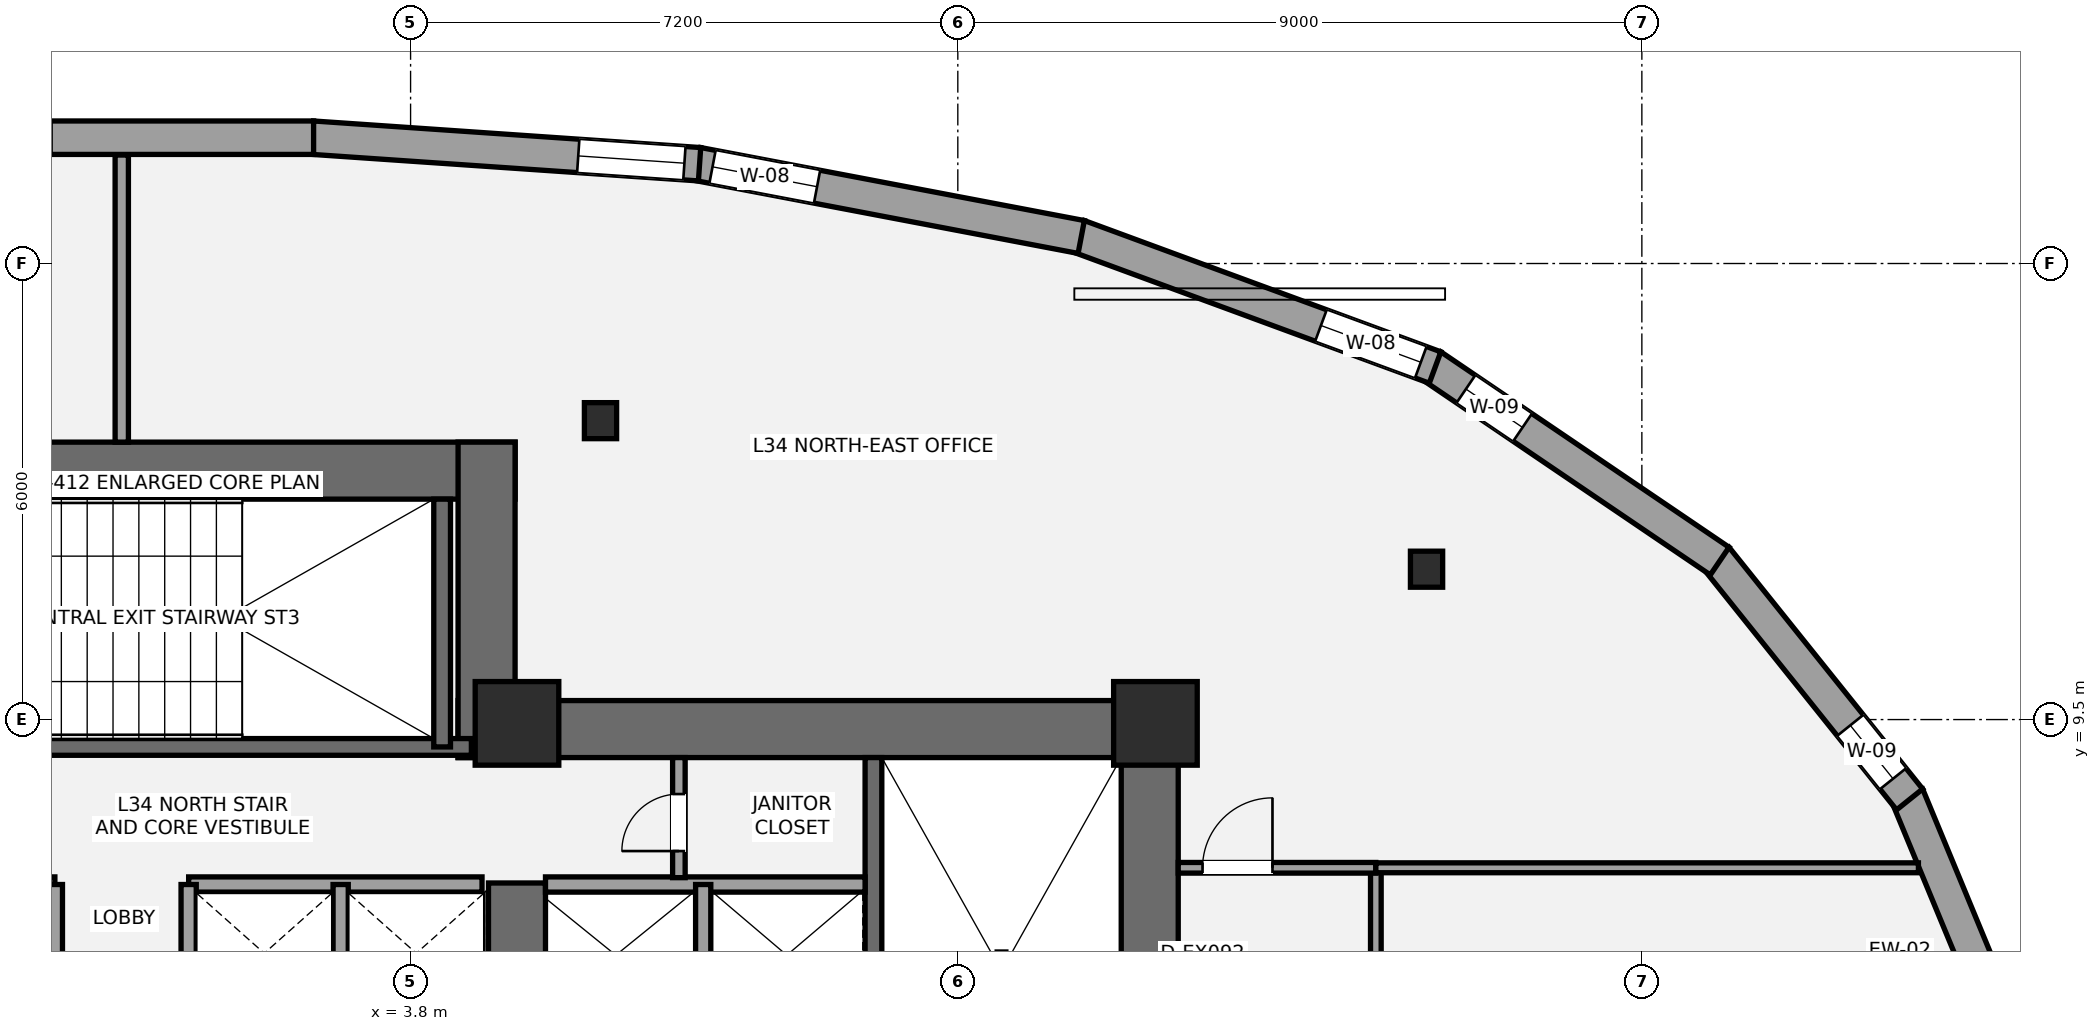
"""IFC4 building model, lengths in metres.
Left out: names, types, materials, properties, quantities, classifications, styles, units other than length and angle.
Written with IfcOpenShell. Run it as: python <this file> out.ifc"""

import sys

from ifc_helpers import new_model, si_unit, direction, frame, frame_2d, origin, origin_2d, place, context, subcontext, project, spatial, rectangle, i_section, extrude, element, fill, save


model = new_model("IFC4")
c1 = context("Model", 3, precision=1e-05, world=origin(), true_north=direction((0.0, 1.0)))
c2 = subcontext(c1, "Body", "Model", "MODEL_VIEW")
j1 = project(units=[si_unit("LENGTHUNIT", "METRE"), si_unit("PLANEANGLEUNIT", "RADIAN")], contexts=[c1])
p1 = place(None, origin())
s1 = spatial("IfcSite", under=j1, at=p1, CompositionType="ELEMENT")
p2 = place(p1, origin())
s2 = spatial("IfcBuilding", under=s1, at=p2, CompositionType="ELEMENT")
p3 = place(p2, frame((0.0, 0.0, 128.1)))
s3 = spatial("IfcBuildingStorey", under=s2, at=p3, CompositionType="ELEMENT", Elevation=128.1)
p4 = place(p3, frame((13.525, 1.1, 0.0), z_axis=(0.0, 0.0, 1.0), x_axis=(0.0, 1.0, 0.0)))
e1 = element("IfcWall", 1, at=p4, inside=s3, PredefinedType="SHEAR", context=c2, shape_type="SweptSolid", body=[
    extrude(rectangle(XDim=8.65, YDim=0.75, at=frame_2d((4.325, 0.0))), origin(), (0.0, 0.0, 1.0), 3.5),
])
p5 = place(p3, frame((4.425, 9.375, 0.0), z_axis=(0.0, 0.0, 1.0), x_axis=(1.0, 0.0, 0.0)))
e2 = element("IfcWall", 2, at=p5, inside=s3, PredefinedType="SHEAR", context=c2, shape_type="SweptSolid", body=[
    extrude(rectangle(XDim=9.475, YDim=0.75, at=frame_2d((4.737, 0.0))), origin(), (0.0, 0.0, 1.0), 3.5),
])
p6 = place(p3, frame((5.2, 5.35, 0.0), z_axis=(0.0, 0.0, 1.0), x_axis=(0.0, 1.0, 0.0)))
e3 = element("IfcWall", 3, at=p6, inside=s3, PredefinedType="SHEAR", context=c2, shape_type="SweptSolid", body=[
    extrude(rectangle(XDim=2.0, YDim=0.75, at=frame_2d((1.0, 0.0))), origin(), (0.0, 0.0, 1.0), 3.5),
])
p7 = place(p3, frame((9.89, 1.85, 0.0), z_axis=(0.0, 0.0, 1.0), x_axis=(0.0, 1.0, 0.0)))
e4 = element("IfcWall", 4, at=p7, inside=s3, PredefinedType="SHEAR", context=c2, shape_type="SweptSolid", body=[
    extrude(rectangle(XDim=7.15, YDim=0.22, at=frame_2d((3.575, 0.0))), origin(), (0.0, 0.0, 1.0), 3.5),
])
p8 = place(p3, frame((-5.175, 12.775, 0.0), z_axis=(0.0, 0.0, 1.0), x_axis=(1.0, 0.0, 0.0)))
e5 = element("IfcWall", 5, at=p8, inside=s3, PredefinedType="SHEAR", context=c2, shape_type="SweptSolid", body=[
    extrude(rectangle(XDim=10.35, YDim=0.75, at=frame_2d((5.175, 0.0))), origin(), (0.0, 0.0, 1.0), 3.5),
])
p9 = place(p3, frame((4.8, 9.0, 0.0), z_axis=(0.0, 0.0, 1.0), x_axis=(0.0, 1.0, 0.0)))
e6 = element("IfcWall", 6, at=p9, inside=s3, PredefinedType="SHEAR", context=c2, shape_type="SweptSolid", body=[
    extrude(rectangle(XDim=4.15, YDim=0.75, at=frame_2d((2.075, 0.0))), origin(), (0.0, 0.0, 1.0), 3.5),
])
p10 = place(p3, frame((-4.7, 9.14, 0.0), z_axis=(0.0, 0.0, 1.0), x_axis=(1.0, 0.0, 0.0)))
e7 = element("IfcWall", 7, at=p10, inside=s3, PredefinedType="SHEAR", context=c2, shape_type="SweptSolid", body=[
    extrude(rectangle(XDim=9.3, YDim=0.22, at=frame_2d((4.65, 0.0))), origin(), (0.0, 0.0, 1.0), 3.5),
])
p11 = place(p10, frame((1.15, 0.0, 0.0)))
e8 = element("IfcOpeningElement", 8, at=p11, cuts=e7, PredefinedType="OPENING", context=c2, shape_type="SweptSolid", body=[
    extrude(rectangle(XDim=1.05, YDim=2.15, at=frame_2d((0.525, 1.075))), frame((0.0, 0.12, 0.0), z_axis=(0.0, -1.0, 0.0), x_axis=(1.0, 0.0, 0.0)), (0.0, 0.0, 1.0), 0.24),
])
p12 = place(p3, frame((4.215, 9.14, 0.0), z_axis=(0.0, 0.0, 1.0), x_axis=(0.0, 1.0, 0.0)))
e9 = element("IfcWall", 9, at=p12, inside=s3, PredefinedType="SHEAR", context=c2, shape_type="SweptSolid", body=[
    extrude(rectangle(XDim=3.26, YDim=0.22, at=frame_2d((1.63, 0.0))), origin(), (0.0, 0.0, 1.0), 3.5),
])
for number, where, z_axis, x_axis in (
    (10, (5.2, 9.45, 0.0), (0.0, 0.0, 1.0), (1.0, 0.0, 0.0)),
    (11, (13.6, 9.45, 0.0), (0.0, 0.0, 1.0), (1.0, 0.0, 0.0)),
):
    element("IfcColumn", number, at=place(p3, frame(where, z_axis=z_axis, x_axis=x_axis)), inside=s3, PredefinedType="COLUMN", context=c2, shape_type="SweptSolid", body=[
        extrude(rectangle(XDim=1.1, YDim=1.1, at=origin_2d()), origin(), (0.0, 0.0, 1.0), 3.5),
    ])
for number, where, z_axis, x_axis in (
    (12, (17.167, 11.478, 0.0), (0.0, 0.0, 1.0), (1.0, 0.0, 0.0)),
    (13, (6.299, 13.433, 0.0), (0.0, 0.0, 1.0), (1.0, 0.0, 0.0)),
):
    element("IfcColumn", number, at=place(p3, frame(where, z_axis=z_axis, x_axis=x_axis)), inside=s3, PredefinedType="COLUMN", context=c2, shape_type="SweptSolid", body=[
        extrude(i_section(OverallWidth=0.424, OverallDepth=0.474, WebThickness=0.048, FlangeThickness=0.077, at=origin_2d()), origin(), (0.0, 0.0, 1.0), 3.5),
    ])
p13 = place(p3, frame((23.491, 8.503, 0.0), z_axis=(0.0, 0.0, 1.0), x_axis=(0.382433297136, -0.923983102249, 0.0)))
e14 = element("IfcWall", 14, at=p13, inside=s3, PredefinedType="STANDARD", context=c2, shape_type="SweptSolid", body=[
    extrude(rectangle(XDim=3.704, YDim=0.44, at=frame_2d((1.852, 0.0))), origin(), (0.0, 0.0, 1.0), 2.528),
])
p14 = place(p3, frame((20.976, 11.629, 0.0), z_axis=(0.0, 0.0, 1.0), x_axis=(0.625169926256, -0.780488669556, 0.0)))
e15 = element("IfcWall", 15, at=p14, inside=s3, PredefinedType="STANDARD", context=c2, shape_type="SweptSolid", body=[
    extrude(rectangle(XDim=4.074, YDim=0.44, at=frame_2d((2.037, 0.0))), origin(), (0.0, 0.0, 1.0), 2.528),
])
p15 = place(p14, frame((2.826, 0.0, 0.58)))
e16 = element("IfcOpeningElement", 16, at=p15, cuts=e15, PredefinedType="OPENING", context=c2, shape_type="SweptSolid", body=[
    extrude(rectangle(XDim=0.9, YDim=1.35, at=frame_2d((0.45, 0.675))), frame((0.0, 0.23, 0.0), z_axis=(0.0, -1.0, 0.0), x_axis=(1.0, 0.0, 0.0)), (0.0, 0.0, 1.0), 0.46),
])
p16 = place(p3, frame((17.232, 14.156, 0.0), z_axis=(0.0, 0.0, 1.0), x_axis=(0.827687941294, -0.561188624116, 0.0)))
e17 = element("IfcWall", 17, at=p16, inside=s3, PredefinedType="STANDARD", context=c2, shape_type="SweptSolid", body=[
    extrude(rectangle(XDim=4.582, YDim=0.44, at=frame_2d((2.291, 0.0))), origin(), (0.0, 0.0, 1.0), 2.528),
])
p17 = place(p16, frame((0.548, 0.0, 0.58)))
e18 = element("IfcOpeningElement", 18, at=p17, cuts=e17, PredefinedType="OPENING", context=c2, shape_type="SweptSolid", body=[
    extrude(rectangle(XDim=0.9, YDim=1.35, at=frame_2d((0.45, 0.675))), frame((0.0, 0.23, 0.0), z_axis=(0.0, -1.0, 0.0), x_axis=(1.0, 0.0, 0.0)), (0.0, 0.0, 1.0), 0.46),
])
p18 = place(p3, frame((12.589, 15.859, 0.0), z_axis=(0.0, 0.0, 1.0), x_axis=(0.938408147313, -0.345528796278, 0.0)))
e19 = element("IfcWall", 19, at=p18, inside=s3, PredefinedType="STANDARD", context=c2, shape_type="SweptSolid", body=[
    extrude(rectangle(XDim=4.998, YDim=0.44, at=frame_2d((2.499, 0.0))), origin(), (0.0, 0.0, 1.0), 2.528),
])
p19 = place(p18, frame((3.398, 0.0, 0.45)))
e20 = element("IfcOpeningElement", 20, at=p19, cuts=e19, PredefinedType="OPENING", context=c2, shape_type="SweptSolid", body=[
    extrude(rectangle(XDim=1.4, YDim=1.55, at=frame_2d((0.7, 0.775))), frame((0.0, 0.23, 0.0), z_axis=(0.0, -1.0, 0.0), x_axis=(1.0, 0.0, 0.0)), (0.0, 0.0, 1.0), 0.46),
])
p20 = place(p3, frame((7.576, 16.809, 0.0), z_axis=(0.0, 0.0, 1.0), x_axis=(0.982383038938, -0.186878476041, 0.0)))
e21 = element("IfcWall", 21, at=p20, inside=s3, PredefinedType="STANDARD", context=c2, shape_type="SweptSolid", body=[
    extrude(rectangle(XDim=5.138, YDim=0.44, at=frame_2d((2.569, 0.0))), origin(), (0.0, 0.0, 1.0), 2.528),
])
p21 = place(p20, frame((0.2, 0.0, 0.45)))
e22 = element("IfcOpeningElement", 22, at=p21, cuts=e21, PredefinedType="OPENING", context=c2, shape_type="SweptSolid", body=[
    extrude(rectangle(XDim=1.4, YDim=1.55, at=frame_2d((0.7, 0.775))), frame((0.0, 0.23, 0.0), z_axis=(0.0, -1.0, 0.0), x_axis=(1.0, 0.0, 0.0)), (0.0, 0.0, 1.0), 0.46),
])
p22 = place(p3, frame((2.509, 17.156, 0.0), z_axis=(0.0, 0.0, 1.0), x_axis=(0.997652685464, -0.068477143536, 0.0)))
e23 = element("IfcWall", 23, at=p22, inside=s3, PredefinedType="STANDARD", context=c2, shape_type="SweptSolid", body=[
    extrude(rectangle(XDim=5.105, YDim=0.44, at=frame_2d((2.553, 0.0))), origin(), (0.0, 0.0, 1.0), 2.528),
])
p23 = place(p22, frame((3.505, 0.0, 0.58)))
e24 = element("IfcOpeningElement", 24, at=p23, cuts=e23, PredefinedType="OPENING", context=c2, shape_type="SweptSolid", body=[
    extrude(rectangle(XDim=1.4, YDim=1.55, at=frame_2d((0.7, 0.775))), frame((0.0, 0.23, 0.0), z_axis=(0.0, -1.0, 0.0), x_axis=(1.0, 0.0, 0.0)), (0.0, 0.0, 1.0), 0.46),
])
p24 = place(p3, frame((-2.524, 17.155, 0.0), z_axis=(0.0, 0.0, 1.0), x_axis=(1.0, 0.0, 0.0)))
e25 = element("IfcWall", 25, at=p24, inside=s3, PredefinedType="STANDARD", context=c2, shape_type="SweptSolid", body=[
    extrude(rectangle(XDim=5.048, YDim=0.44, at=frame_2d((2.524, 0.0))), origin(), (0.0, 0.0, 1.0), 2.528),
])
p25 = place(p24, frame((0.2, 0.0, 0.45)))
e26 = element("IfcOpeningElement", 26, at=p25, cuts=e25, PredefinedType="OPENING", context=c2, shape_type="SweptSolid", body=[
    extrude(rectangle(XDim=1.4, YDim=1.55, at=frame_2d((0.7, 0.775))), frame((0.0, 0.23, 0.0), z_axis=(0.0, -1.0, 0.0), x_axis=(1.0, 0.0, 0.0)), (0.0, 0.0, 1.0), 0.46),
])
p26 = place(p3, frame((5.575, 7.33, 0.0), z_axis=(0.0, 0.0, 1.0), x_axis=(1.0, 0.0, 0.0)))
e27 = element("IfcWall", 27, at=p26, inside=s3, PredefinedType="SOLIDWALL", context=c2, shape_type="SweptSolid", body=[
    extrude(rectangle(XDim=4.205, YDim=0.2, at=frame_2d((2.103, 0.0))), origin(), (0.0, 0.0, 1.0), 3.31),
])
p27 = place(p3, frame((7.65, 5.47, 0.0), z_axis=(0.0, 0.0, 1.0), x_axis=(0.0, 1.0, 0.0)))
e28 = element("IfcWall", 28, at=p27, inside=s3, PredefinedType="SOLIDWALL", context=c2, shape_type="SweptSolid", body=[
    extrude(rectangle(XDim=1.86, YDim=0.2, at=frame_2d((0.93, 0.0))), origin(), (0.0, 0.0, 1.0), 3.31),
])
for number, where, z_axis, x_axis in (
    (29, (-4.74, 7.33, 0.0), (0.0, 0.0, 1.0), (1.0, 0.0, 0.0)),
    (30, (0.88, 7.33, 0.0), (0.0, 0.0, 1.0), (1.0, 0.0, 0.0)),
):
    element("IfcWall", number, at=place(p3, frame(where, z_axis=z_axis, x_axis=x_axis)), inside=s3, PredefinedType="SOLIDWALL", context=c2, shape_type="SweptSolid", body=[
        extrude(rectangle(XDim=3.86, YDim=0.2, at=frame_2d((1.93, 0.0))), origin(), (0.0, 0.0, 1.0), 3.31),
    ])
for number, where, z_axis, x_axis in (
    (31, (2.88, 5.52, 0.0), (0.0, 0.0, 1.0), (0.0, 1.0, 0.0)),
    (32, (-0.88, 5.52, 0.0), (0.0, 0.0, 1.0), (0.0, 1.0, 0.0)),
    (33, (0.88, 5.52, 0.0), (0.0, 0.0, 1.0), (0.0, 1.0, 0.0)),
):
    element("IfcWall", number, at=place(p3, frame(where, z_axis=z_axis, x_axis=x_axis)), inside=s3, PredefinedType="SOLIDWALL", context=c2, shape_type="SweptSolid", body=[
        extrude(rectangle(XDim=1.81, YDim=0.2, at=frame_2d((0.905, 0.0))), origin(), (0.0, 0.0, 1.0), 3.31),
    ])
p28 = place(p3, frame((7.33, 7.42, 0.0), z_axis=(0.0, 0.0, 1.0), x_axis=(0.0, 1.0, 0.0)))
e34 = element("IfcWall", 34, at=p28, inside=s3, PredefinedType="PARTITIONING", context=c2, shape_type="SweptSolid", body=[
    extrude(rectangle(XDim=1.58, YDim=0.165, at=frame_2d((0.79, 0.0))), origin(), (0.0, 0.0, 1.0), 3.31),
])
p29 = place(p28, frame((0.35, 0.0, 0.0)))
e35 = element("IfcOpeningElement", 35, at=p29, cuts=e34, PredefinedType="OPENING", context=c2, shape_type="SweptSolid", body=[
    extrude(rectangle(XDim=0.75, YDim=2.1, at=frame_2d((0.375, 1.05))), frame((0.0, 0.093, 0.0), z_axis=(0.0, -1.0, 0.0), x_axis=(1.0, 0.0, 0.0)), (0.0, 0.0, 1.0), 0.185),
])
p30 = place(p3, frame((16.5, -10.633, 0.0), z_axis=(0.0, 0.0, 1.0), x_axis=(0.0, 1.0, 0.0)))
e36 = element("IfcWall", 36, at=p30, inside=s3, PredefinedType="PARTITIONING", context=c2, shape_type="SweptSolid", body=[
    extrude(rectangle(XDim=18.183, YDim=0.14, at=frame_2d((9.091, 0.0))), origin(), (0.0, 0.0, 1.0), 2.763),
])
p31 = place(p30, frame((5.883, 0.0, 0.0)))
e37 = element("IfcOpeningElement", 37, at=p31, cuts=e36, PredefinedType="OPENING", context=c2, shape_type="SweptSolid", body=[
    extrude(rectangle(XDim=0.9, YDim=2.1, at=frame_2d((0.45, 1.05))), frame((0.0, 0.08, 0.0), z_axis=(0.0, -1.0, 0.0), x_axis=(1.0, 0.0, 0.0)), (0.0, 0.0, 1.0), 0.16),
])
p32 = place(p30, frame((11.483, 0.0, 0.0)))
e38 = element("IfcOpeningElement", 38, at=p32, cuts=e36, PredefinedType="OPENING", context=c2, shape_type="SweptSolid", body=[
    extrude(rectangle(XDim=0.9, YDim=2.1, at=frame_2d((0.45, 1.05))), frame((0.0, 0.08, 0.0), z_axis=(0.0, -1.0, 0.0), x_axis=(1.0, 0.0, 0.0)), (0.0, 0.0, 1.0), 0.16),
])
p33 = place(p30, frame((15.758, 0.0, 0.0)))
e39 = element("IfcOpeningElement", 39, at=p33, cuts=e36, PredefinedType="OPENING", context=c2, shape_type="SweptSolid", body=[
    extrude(rectangle(XDim=0.9, YDim=2.1, at=frame_2d((0.45, 1.05))), frame((0.0, 0.08, 0.0), z_axis=(0.0, -1.0, 0.0), x_axis=(1.0, 0.0, 0.0)), (0.0, 0.0, 1.0), 0.16),
])
p34 = place(p3, frame((13.9, 7.55, 0.0), z_axis=(0.0, 0.0, 1.0), x_axis=(1.0, 0.0, 0.0)))
e40 = element("IfcWall", 40, at=p34, inside=s3, PredefinedType="PARTITIONING", context=c2, shape_type="SweptSolid", body=[
    extrude(rectangle(XDim=2.6, YDim=0.14, at=frame_2d((1.3, 0.0))), origin(), (0.0, 0.0, 1.0), 3.31),
])
p35 = place(p34, frame((0.32, 0.0, 0.0)))
e41 = element("IfcOpeningElement", 41, at=p35, cuts=e40, PredefinedType="OPENING", context=c2, shape_type="SweptSolid", body=[
    extrude(rectangle(XDim=0.92, YDim=2.15, at=frame_2d((0.46, 1.075))), frame((0.0, 0.08, 0.0), z_axis=(0.0, -1.0, 0.0), x_axis=(1.0, 0.0, 0.0)), (0.0, 0.0, 1.0), 0.16),
])
p36 = place(p3, frame((0.0, 13.15, 0.0), z_axis=(0.0, 0.0, 1.0), x_axis=(0.0, 1.0, 0.0)))
e42 = element("IfcWall", 42, at=p36, inside=s3, PredefinedType="PARTITIONING", context=c2, shape_type="SweptSolid", body=[
    extrude(rectangle(XDim=3.777, YDim=0.175, at=frame_2d((1.889, 0.0))), origin(), (0.0, 0.0, 1.0), 3.31),
])
p37 = place(p3, frame((16.5, 7.55, 0.0), z_axis=(0.0, 0.0, 1.0), x_axis=(1.0, 0.0, 0.0)))
e43 = element("IfcWall", 43, at=p37, inside=s3, PredefinedType="PARTITIONING", context=c2, shape_type="SweptSolid", body=[
    extrude(rectangle(XDim=7.139, YDim=0.13, at=frame_2d((3.569, 0.0))), origin(), (0.0, 0.0, 1.0), 2.763),
])
p38 = place(p15, origin())
e44 = element("IfcWindow", 44, at=p38, inside=s3, PartitioningType="SINGLE_PANEL", PredefinedType="WINDOW", context=c2, shape_type="SweptSolid", body=[
    extrude(rectangle(XDim=0.9, YDim=1.35, at=frame_2d((0.45, 0.675))), frame((0.0, -0.01, 0.0), z_axis=(0.0, -1.0, 0.0), x_axis=(1.0, 0.0, 0.0)), (0.0, 0.0, 1.0), 0.06),
])
fill(e16, e44)
p39 = place(p17, origin())
e45 = element("IfcWindow", 45, at=p39, inside=s3, PartitioningType="SINGLE_PANEL", PredefinedType="WINDOW", context=c2, shape_type="SweptSolid", body=[
    extrude(rectangle(XDim=0.9, YDim=1.35, at=frame_2d((0.45, 0.675))), frame((0.0, -0.01, 0.0), z_axis=(0.0, -1.0, 0.0), x_axis=(1.0, 0.0, 0.0)), (0.0, 0.0, 1.0), 0.06),
])
fill(e18, e45)
p40 = place(p19, origin())
e46 = element("IfcWindow", 46, at=p40, inside=s3, PartitioningType="SINGLE_PANEL", PredefinedType="WINDOW", context=c2, shape_type="SweptSolid", body=[
    extrude(rectangle(XDim=1.4, YDim=1.55, at=frame_2d((0.7, 0.775))), frame((0.0, -0.01, 0.0), z_axis=(0.0, -1.0, 0.0), x_axis=(1.0, 0.0, 0.0)), (0.0, 0.0, 1.0), 0.06),
])
fill(e20, e46)
p41 = place(p21, origin())
e47 = element("IfcWindow", 47, at=p41, inside=s3, PartitioningType="SINGLE_PANEL", PredefinedType="WINDOW", context=c2, shape_type="SweptSolid", body=[
    extrude(rectangle(XDim=1.4, YDim=1.55, at=frame_2d((0.7, 0.775))), frame((0.0, -0.01, 0.0), z_axis=(0.0, -1.0, 0.0), x_axis=(1.0, 0.0, 0.0)), (0.0, 0.0, 1.0), 0.06),
])
fill(e22, e47)
p42 = place(p23, origin())
e48 = element("IfcWindow", 48, at=p42, inside=s3, PartitioningType="SINGLE_PANEL", PredefinedType="WINDOW", context=c2, shape_type="SweptSolid", body=[
    extrude(rectangle(XDim=1.4, YDim=1.55, at=frame_2d((0.7, 0.775))), frame((0.0, -0.01, 0.0), z_axis=(0.0, -1.0, 0.0), x_axis=(1.0, 0.0, 0.0)), (0.0, 0.0, 1.0), 0.06),
])
fill(e24, e48)
p43 = place(p29, origin())
e49 = element("IfcDoor", 49, at=p43, inside=s3, OperationType="SINGLE_SWING_LEFT", PredefinedType="DOOR", context=c2, shape_type="SweptSolid", body=[
    extrude(rectangle(XDim=0.75, YDim=2.1, at=frame_2d((0.375, 1.05))), frame((0.0, 0.025, 0.0), z_axis=(0.0, -1.0, 0.0), x_axis=(1.0, 0.0, 0.0)), (0.0, 0.0, 1.0), 0.05),
])
fill(e35, e49)
p44 = place(p35, origin())
e50 = element("IfcDoor", 50, at=p44, inside=s3, OperationType="SINGLE_SWING_RIGHT", PredefinedType="DOOR", context=c2, shape_type="SweptSolid", body=[
    extrude(rectangle(XDim=0.92, YDim=2.15, at=frame_2d((0.46, 1.075))), frame((0.0, 0.025, 0.0), z_axis=(0.0, -1.0, 0.0), x_axis=(1.0, 0.0, 0.0)), (0.0, 0.0, 1.0), 0.05),
])
fill(e41, e50)
save(model, sys.argv[1])
